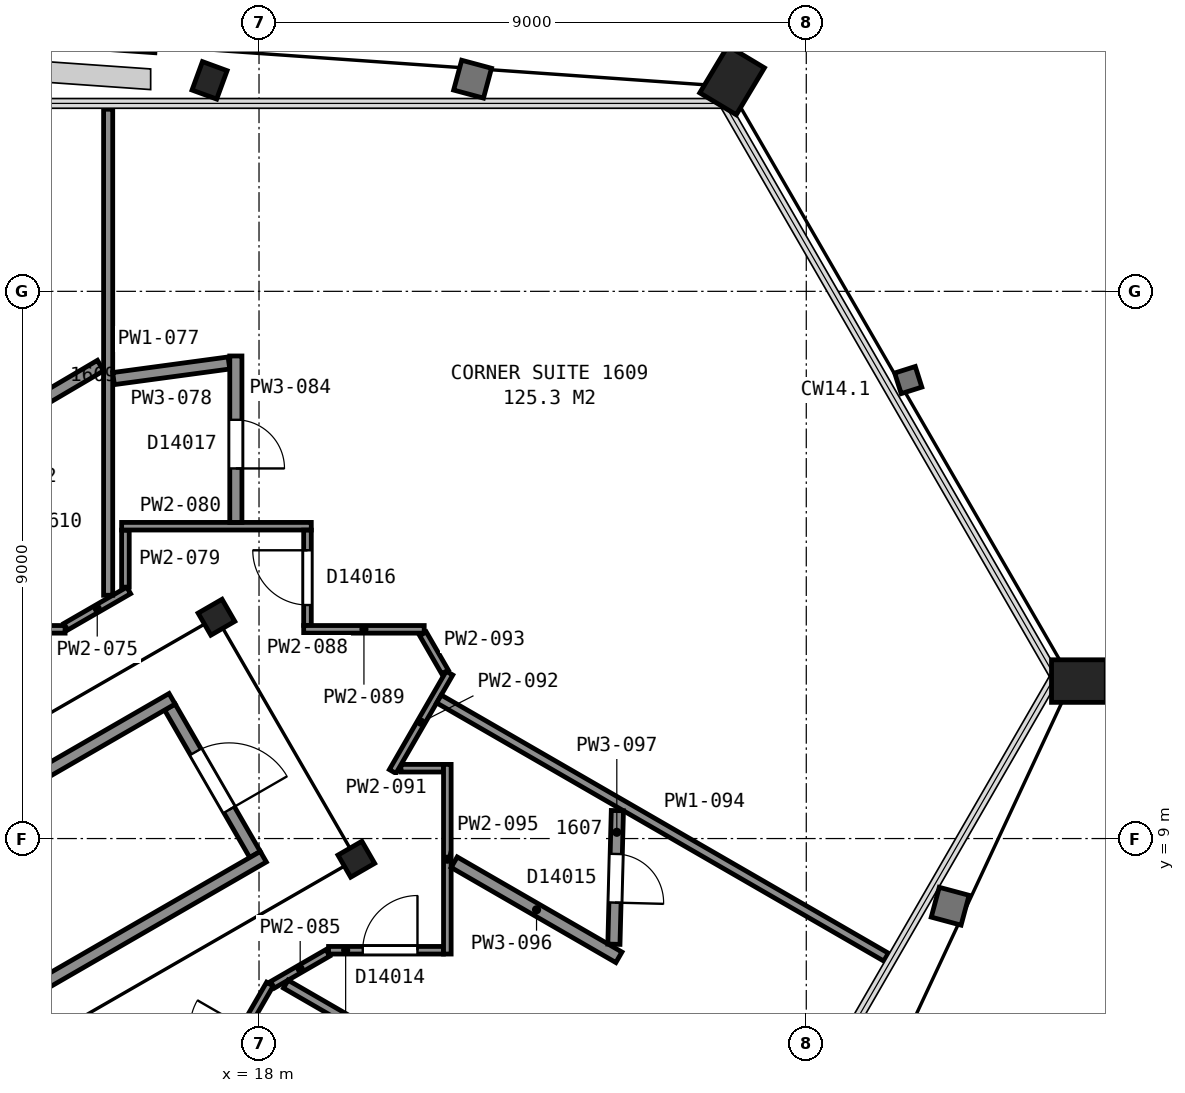
"""IFC4 building model, lengths in metres.
Left out: names, types, materials, properties, quantities, classifications, styles, units other than length and angle.
Written with IfcOpenShell. Run it as: python <this file> out.ifc"""

import sys

from ifc_helpers import new_model, si_unit, direction, frame, frame_2d, origin, origin_2d, place, context, subcontext, project, spatial, rectangle, hollow_rectangle, i_section, extrude, element, fill, save


model = new_model("IFC4")
c1 = context("Model", 3, precision=1e-05, world=origin(), true_north=direction((0.0, 1.0)))
c2 = subcontext(c1, "Body", "Model", "MODEL_VIEW")
j1 = project(units=[si_unit("LENGTHUNIT", "METRE"), si_unit("PLANEANGLEUNIT", "RADIAN")], contexts=[c1])
p1 = place(None, origin())
s1 = spatial("IfcSite", under=j1, at=p1, CompositionType="ELEMENT")
p2 = place(p1, origin())
s2 = spatial("IfcBuilding", under=s1, at=p2, CompositionType="ELEMENT")
p3 = place(p2, frame((0.0, 0.0, 72.8)))
s3 = spatial("IfcBuildingStorey", under=s2, at=p3, CompositionType="ELEMENT", Elevation=72.8)
p4 = place(p3, frame((25.722, 21.373, 0.04), z_axis=(0.049772291919, 0.082976830634, 0.995307773774), x_axis=(0.499550777014, -0.86500147592, 0.047132449981)))
e1 = element("IfcColumn", 1, at=p4, inside=s3, PredefinedType="COLUMN", context=c2, shape_type="SweptSolid", body=[
    extrude(hollow_rectangle(XDim=0.7, YDim=0.9, WallThickness=0.065, at=origin_2d()), origin(), (0.0, 0.0, 1.0), 3.537),
])
p5 = place(p3, frame((17.151, 21.372, 0.025), z_axis=(0.030414757347, 0.083024067354, 0.996083303131), x_axis=(0.999533369763, 0.000291044086, -0.030544361571)))
e2 = element("IfcColumn", 2, at=p5, inside=s3, PredefinedType="COLUMN", context=c2, shape_type="SweptSolid", body=[
    extrude(i_section(OverallWidth=0.432, OverallDepth=0.498, WebThickness=0.056, FlangeThickness=0.089, FilletRadius=0.015, at=origin_2d()), origin(), (0.0, 0.0, 1.0), 3.564),
])
p6 = place(p3, frame((31.374, 11.59, 0.04), z_axis=(0.094046562862, 0.0, 0.995567799808), x_axis=(0.499442771107, -0.865061250551, -0.047179987117)))
e3 = element("IfcColumn", 3, at=p6, inside=s3, PredefinedType="COLUMN", context=c2, shape_type="SweptSolid", body=[
    extrude(hollow_rectangle(XDim=0.7, YDim=0.9, WallThickness=0.065, at=origin_2d()), origin(), (0.0, 0.0, 1.0), 3.536),
])
for number, where, z_axis, x_axis in (
    (4, (19.6, 8.66, 0.0), (0.0, 0.0, 1.0), (0.5, -0.866, 0.0)),
    (5, (17.3, 12.64, 0.0), (0.0, 0.0, 1.0), (0.5, -0.866, 0.0)),
):
    element("IfcColumn", number, at=place(p3, frame(where, z_axis=z_axis, x_axis=x_axis)), inside=s3, PredefinedType="COLUMN", context=c2, shape_type="SweptSolid", body=[
        extrude(i_section(OverallWidth=0.419, OverallDepth=0.455, WebThickness=0.042, FlangeThickness=0.068, FilletRadius=0.015, at=origin_2d()), origin(), (0.0, 0.0, 1.0), 3.6),
    ])
p7 = place(p3, frame((17.934, 8.738, 0.0), z_axis=(0.0, 0.0, 1.0), x_axis=(-0.49998411664, 0.866034573852, 0.0)))
e6 = element("IfcWall", 6, at=p7, inside=s3, PredefinedType="PARTITIONING", context=c2, shape_type="SweptSolid", body=[
    extrude(rectangle(XDim=2.8, YDim=0.2, at=frame_2d((1.4, 0.0))), origin(), (0.0, 0.0, 1.0), 3.35),
])
p8 = place(p7, frame((0.85, 0.0, 0.0)))
e7 = element("IfcOpeningElement", 7, at=p8, cuts=e6, PredefinedType="OPENING", context=c2, shape_type="SweptSolid", body=[
    extrude(rectangle(XDim=1.1, YDim=2.1, at=frame_2d((0.55, 1.05))), frame((0.0, 0.11, 0.0), z_axis=(0.0, -1.0, 0.0), x_axis=(1.0, 0.0, 0.0)), (0.0, 0.0, 1.0), 0.22),
])
for number, where, z_axis, x_axis in (
    (8, (6.178, 5.299, 0.0), (0.0, 0.0, 1.0), (0.866, 0.5, 0.0)),
    (9, (7.678, 2.701, 0.0), (0.0, 0.0, 1.0), (0.866, 0.5, 0.0)),
):
    element("IfcWall", number, at=place(p3, frame(where, z_axis=z_axis, x_axis=x_axis)), inside=s3, PredefinedType="PARTITIONING", context=c2, shape_type="SweptSolid", body=[
        extrude(rectangle(XDim=12.0, YDim=0.2, at=frame_2d((6.0, 0.0))), origin(), (0.0, 0.0, 1.0), 3.35),
    ])
p9 = place(p3, frame((-14.811, 12.441, 0.0), z_axis=(0.0, 0.0, 1.0), x_axis=(1.0, 0.0, 0.0)))
e10 = element("IfcWall", 10, at=p9, inside=s3, PredefinedType="PARTITIONING", context=c2, shape_type="SweptSolid", body=[
    extrude(rectangle(XDim=29.621, YDim=0.125, at=frame_2d((14.811, 0.0))), origin(), (0.0, 0.0, 1.0), 2.613),
])
p10 = place(p9, frame((25.326, 0.0, 0.0)))
e11 = element("IfcOpeningElement", 11, at=p10, cuts=e10, PredefinedType="OPENING", context=c2, shape_type="SweptSolid", body=[
    extrude(rectangle(XDim=0.9, YDim=2.1, at=frame_2d((0.45, 1.05))), frame((0.0, 0.073, 0.0), z_axis=(0.0, -1.0, 0.0), x_axis=(1.0, 0.0, 0.0)), (0.0, 0.0, 1.0), 0.145),
])
p11 = place(p9, frame((21.833, 0.0, 0.0)))
e12 = element("IfcOpeningElement", 12, at=p11, cuts=e10, PredefinedType="OPENING", context=c2, shape_type="SweptSolid", body=[
    extrude(rectangle(XDim=0.9, YDim=2.1, at=frame_2d((0.45, 1.05))), frame((0.0, 0.073, 0.0), z_axis=(0.0, -1.0, 0.0), x_axis=(1.0, 0.0, 0.0)), (0.0, 0.0, 1.0), 0.145),
])
p12 = place(p9, frame((14.99, 0.0, 0.0)))
e13 = element("IfcOpeningElement", 13, at=p12, cuts=e10, PredefinedType="OPENING", context=c2, shape_type="SweptSolid", body=[
    extrude(rectangle(XDim=0.9, YDim=2.1, at=frame_2d((0.45, 1.05))), frame((0.0, 0.073, 0.0), z_axis=(0.0, -1.0, 0.0), x_axis=(1.0, 0.0, 0.0)), (0.0, 0.0, 1.0), 0.145),
])
p13 = place(p9, frame((12.128, 0.0, 0.0)))
e14 = element("IfcOpeningElement", 14, at=p13, cuts=e10, PredefinedType="OPENING", context=c2, shape_type="SweptSolid", body=[
    extrude(rectangle(XDim=0.9, YDim=2.1, at=frame_2d((0.45, 1.05))), frame((0.0, 0.073, 0.0), z_axis=(0.0, -1.0, 0.0), x_axis=(1.0, 0.0, 0.0)), (0.0, 0.0, 1.0), 0.145),
])
p14 = place(p9, frame((4.885, 0.0, 0.0)))
e15 = element("IfcOpeningElement", 15, at=p14, cuts=e10, PredefinedType="OPENING", context=c2, shape_type="SweptSolid", body=[
    extrude(rectangle(XDim=0.9, YDim=2.1, at=frame_2d((0.45, 1.05))), frame((0.0, 0.073, 0.0), z_axis=(0.0, -1.0, 0.0), x_axis=(1.0, 0.0, 0.0)), (0.0, 0.0, 1.0), 0.145),
])
p15 = place(p9, frame((2.241, 0.0, 0.0)))
e16 = element("IfcOpeningElement", 16, at=p15, cuts=e10, PredefinedType="OPENING", context=c2, shape_type="SweptSolid", body=[
    extrude(rectangle(XDim=0.9, YDim=2.1, at=frame_2d((0.45, 1.05))), frame((0.0, 0.073, 0.0), z_axis=(0.0, -1.0, 0.0), x_axis=(1.0, 0.0, 0.0)), (0.0, 0.0, 1.0), 0.145),
])
p16 = place(p3, frame((18.179, 6.606, 0.0), z_axis=(0.0, 0.0, 1.0), x_axis=(-0.500003973642, -0.866023109589, 0.0)))
e17 = element("IfcWall", 17, at=p16, inside=s3, PredefinedType="PARTITIONING", context=c2, shape_type="SweptSolid", body=[
    extrude(rectangle(XDim=28.826, YDim=0.125, at=frame_2d((14.413, 0.0))), origin(), (0.0, 0.0, 1.0), 2.613),
])
p17 = place(p16, frame((21.501, 0.0, 0.0)))
e18 = element("IfcOpeningElement", 18, at=p17, cuts=e17, PredefinedType="OPENING", context=c2, shape_type="SweptSolid", body=[
    extrude(rectangle(XDim=0.9, YDim=2.1, at=frame_2d((0.45, 1.05))), frame((0.0, 0.073, 0.0), z_axis=(0.0, -1.0, 0.0), x_axis=(1.0, 0.0, 0.0)), (0.0, 0.0, 1.0), 0.145),
])
p18 = place(p16, frame((18.894, 0.0, 0.0)))
e19 = element("IfcOpeningElement", 19, at=p18, cuts=e17, PredefinedType="OPENING", context=c2, shape_type="SweptSolid", body=[
    extrude(rectangle(XDim=0.9, YDim=2.1, at=frame_2d((0.45, 1.05))), frame((0.0, 0.073, 0.0), z_axis=(0.0, -1.0, 0.0), x_axis=(1.0, 0.0, 0.0)), (0.0, 0.0, 1.0), 0.145),
])
p19 = place(p16, frame((10.937, 0.0, 0.0)))
e20 = element("IfcOpeningElement", 20, at=p19, cuts=e17, PredefinedType="OPENING", context=c2, shape_type="SweptSolid", body=[
    extrude(rectangle(XDim=0.9, YDim=2.1, at=frame_2d((0.45, 1.05))), frame((0.0, 0.073, 0.0), z_axis=(0.0, -1.0, 0.0), x_axis=(1.0, 0.0, 0.0)), (0.0, 0.0, 1.0), 0.145),
])
p20 = place(p16, frame((7.535, 0.0, 0.0)))
e21 = element("IfcOpeningElement", 21, at=p20, cuts=e17, PredefinedType="OPENING", context=c2, shape_type="SweptSolid", body=[
    extrude(rectangle(XDim=0.9, YDim=2.1, at=frame_2d((0.45, 1.05))), frame((0.0, 0.073, 0.0), z_axis=(0.0, -1.0, 0.0), x_axis=(1.0, 0.0, 0.0)), (0.0, 0.0, 1.0), 0.145),
])
p21 = place(p16, frame((0.827, 0.0, 0.0)))
e22 = element("IfcOpeningElement", 22, at=p21, cuts=e17, PredefinedType="OPENING", context=c2, shape_type="SweptSolid", body=[
    extrude(rectangle(XDim=0.9, YDim=2.1, at=frame_2d((0.45, 1.05))), frame((0.0, 0.073, 0.0), z_axis=(0.0, -1.0, 0.0), x_axis=(1.0, 0.0, 0.0)), (0.0, 0.0, 1.0), 0.145),
])
p22 = place(p3, frame((13.235, 15.51, 0.0), z_axis=(0.0, 0.0, 1.0), x_axis=(0.861909146735, 0.507062740471, 0.0)))
e23 = element("IfcWall", 23, at=p22, inside=s3, PredefinedType="PARTITIONING", context=c2, shape_type="SweptSolid", body=[
    extrude(rectangle(XDim=2.504, YDim=0.2, at=frame_2d((1.252, 0.0))), origin(), (0.0, 0.0, 1.0), 2.613),
])
p23 = place(p3, frame((14.822, 12.483, 0.0), z_axis=(0.0, 0.0, 1.0), x_axis=(0.866035997947, 0.499981649923, 0.0)))
e24 = element("IfcWall", 24, at=p23, inside=s3, PredefinedType="PARTITIONING", context=c2, shape_type="SweptSolid", body=[
    extrude(rectangle(XDim=1.196, YDim=0.125, at=frame_2d((0.598, 0.0))), origin(), (0.0, 0.0, 1.0), 2.613),
])
p24 = place(p3, frame((15.519, 13.001, 0.0), z_axis=(0.0, 0.0, 1.0), x_axis=(0.0, 1.0, 0.0)))
e25 = element("IfcWall", 25, at=p24, inside=s3, PredefinedType="PARTITIONING", context=c2, shape_type="SweptSolid", body=[
    extrude(rectangle(XDim=7.994, YDim=0.15, at=frame_2d((3.997, 0.0))), origin(), (0.0, 0.0, 1.0), 2.613),
])
p25 = place(p3, frame((15.607, 16.565, 0.0), z_axis=(0.0, 0.0, 1.0), x_axis=(0.990982367401, 0.133992341199, 0.0)))
e26 = element("IfcWall", 26, at=p25, inside=s3, PredefinedType="PARTITIONING", context=c2, shape_type="SweptSolid", body=[
    extrude(rectangle(XDim=1.915, YDim=0.2, at=frame_2d((0.958, 0.0))), origin(), (0.0, 0.0, 1.0), 2.613),
])
p26 = place(p3, frame((15.803, 13.135, 0.0), z_axis=(0.0, 0.0, 1.0), x_axis=(0.0, 1.0, 0.0)))
e27 = element("IfcWall", 27, at=p26, inside=s3, PredefinedType="PARTITIONING", context=c2, shape_type="SweptSolid", body=[
    extrude(rectangle(XDim=0.937, YDim=0.125, at=frame_2d((0.469, 0.0))), origin(), (0.0, 0.0, 1.0), 2.613),
])
p27 = place(p3, frame((15.74, 14.137, 0.0), z_axis=(0.0, 0.0, 1.0), x_axis=(1.0, 0.0, 0.0)))
e28 = element("IfcWall", 28, at=p27, inside=s3, PredefinedType="PARTITIONING", context=c2, shape_type="SweptSolid", body=[
    extrude(rectangle(XDim=3.119, YDim=0.125, at=frame_2d((1.56, 0.0))), origin(), (0.0, 0.0, 1.0), 2.613),
])
p28 = place(p3, frame((17.619, 14.199, 0.0), z_axis=(0.0, 0.0, 1.0), x_axis=(0.0, 1.0, 0.0)))
e29 = element("IfcWall", 29, at=p28, inside=s3, PredefinedType="PARTITIONING", context=c2, shape_type="SweptSolid", body=[
    extrude(rectangle(XDim=2.738, YDim=0.2, at=frame_2d((1.369, 0.0))), origin(), (0.0, 0.0, 1.0), 2.613),
])
p29 = place(p28, frame((0.887, 0.0, 0.0)))
e30 = element("IfcOpeningElement", 30, at=p29, cuts=e29, PredefinedType="OPENING", context=c2, shape_type="SweptSolid", body=[
    extrude(rectangle(XDim=0.8, YDim=2.1, at=frame_2d((0.4, 1.05))), frame((0.0, 0.11, 0.0), z_axis=(0.0, -1.0, 0.0), x_axis=(1.0, 0.0, 0.0)), (0.0, 0.0, 1.0), 0.22),
])
p30 = place(p3, frame((18.222, 6.594, 0.0), z_axis=(0.0, 0.0, 1.0), x_axis=(0.865876245925, 0.500258260045, 0.0)))
e31 = element("IfcWall", 31, at=p30, inside=s3, PredefinedType="PARTITIONING", context=c2, shape_type="SweptSolid", body=[
    extrude(rectangle(XDim=1.052, YDim=0.125, at=frame_2d((0.526, 0.0))), origin(), (0.0, 0.0, 1.0), 2.613),
])
p31 = place(p3, frame((18.44, 6.605, 0.0), z_axis=(0.0, 0.0, 1.0), x_axis=(0.866044499518, -0.49996692376, 0.0)))
e32 = element("IfcWall", 32, at=p31, inside=s3, PredefinedType="PARTITIONING", context=c2, shape_type="SweptSolid", body=[
    extrude(rectangle(XDim=8.328, YDim=0.15, at=frame_2d((4.164, 0.0))), origin(), (0.0, 0.0, 1.0), 2.613),
])
p32 = place(p3, frame((18.797, 14.072, 0.0), z_axis=(0.0, 0.0, 1.0), x_axis=(0.0, -1.0, 0.0)))
e33 = element("IfcWall", 33, at=p32, inside=s3, PredefinedType="PARTITIONING", context=c2, shape_type="SweptSolid", body=[
    extrude(rectangle(XDim=1.566, YDim=0.125, at=frame_2d((0.783, 0.0))), origin(), (0.0, 0.0, 1.0), 2.613),
])
p33 = place(p32, frame((0.331, 0.0, 0.0)))
e34 = element("IfcOpeningElement", 34, at=p33, cuts=e33, PredefinedType="OPENING", context=c2, shape_type="SweptSolid", body=[
    extrude(rectangle(XDim=0.9, YDim=2.1, at=frame_2d((0.45, 1.05))), frame((0.0, 0.073, 0.0), z_axis=(0.0, -1.0, 0.0), x_axis=(1.0, 0.0, 0.0)), (0.0, 0.0, 1.0), 0.145),
])
p34 = place(p3, frame((18.735, 12.441, 0.0), z_axis=(0.0, 0.0, 1.0), x_axis=(1.0, 0.0, 0.0)))
e35 = element("IfcWall", 35, at=p34, inside=s3, PredefinedType="PARTITIONING", context=c2, shape_type="SweptSolid", body=[
    extrude(rectangle(XDim=1.982, YDim=0.125, at=frame_2d((0.991, 0.0))), origin(), (0.0, 0.0, 1.0), 2.613),
])
p35 = place(p3, frame((21.032, 7.163, 0.0), z_axis=(0.0, 0.0, 1.0), x_axis=(-1.0, 0.0, 0.0)))
e36 = element("IfcWall", 36, at=p35, inside=s3, PredefinedType="PARTITIONING", context=c2, shape_type="SweptSolid", body=[
    extrude(rectangle(XDim=1.888, YDim=0.125, at=frame_2d((0.944, 0.0))), origin(), (0.0, 0.0, 1.0), 2.613),
])
p36 = place(p35, frame((0.426, 0.0, 0.0)))
e37 = element("IfcOpeningElement", 37, at=p36, cuts=e36, PredefinedType="OPENING", context=c2, shape_type="SweptSolid", body=[
    extrude(rectangle(XDim=0.9, YDim=2.1, at=frame_2d((0.45, 1.05))), frame((0.0, 0.073, 0.0), z_axis=(0.0, -1.0, 0.0), x_axis=(1.0, 0.0, 0.0)), (0.0, 0.0, 1.0), 0.145),
])
p37 = place(p3, frame((20.334, 10.157, 0.0), z_axis=(0.0, 0.0, 1.0), x_axis=(1.0, 0.0, 0.0)))
e38 = element("IfcWall", 38, at=p37, inside=s3, PredefinedType="PARTITIONING", context=c2, shape_type="SweptSolid", body=[
    extrude(rectangle(XDim=0.698, YDim=0.125, at=frame_2d((0.349, 0.0))), origin(), (0.0, 0.0, 1.0), 2.613),
])
p38 = place(p3, frame((20.198, 10.103, 0.0), z_axis=(0.0, 0.0, 1.0), x_axis=(0.500072997275, 0.865983254686, 0.0)))
e39 = element("IfcWall", 39, at=p38, inside=s3, PredefinedType="PARTITIONING", context=c2, shape_type="SweptSolid", body=[
    extrude(rectangle(XDim=1.869, YDim=0.125, at=frame_2d((0.935, 0.0))), origin(), (0.0, 0.0, 1.0), 2.613),
])
p39 = place(p3, frame((20.697, 12.367, 0.0), z_axis=(0.0, 0.0, 1.0), x_axis=(0.500238258503, -0.865887801468, 0.0)))
e40 = element("IfcWall", 40, at=p39, inside=s3, PredefinedType="PARTITIONING", context=c2, shape_type="SweptSolid", body=[
    extrude(rectangle(XDim=0.724, YDim=0.125, at=frame_2d((0.362, 0.0))), origin(), (0.0, 0.0, 1.0), 2.613),
])
p40 = place(p3, frame((20.959, 11.296, 0.0), z_axis=(0.0, 0.0, 1.0), x_axis=(0.866022790583, -0.50000452617, 0.0)))
e41 = element("IfcWall", 41, at=p40, inside=s3, PredefinedType="PARTITIONING", context=c2, shape_type="SweptSolid", body=[
    extrude(rectangle(XDim=8.491, YDim=0.15, at=frame_2d((4.246, 0.0))), origin(), (0.0, 0.0, 1.0), 2.613),
])
p41 = place(p3, frame((21.097, 7.101, 0.0), z_axis=(0.0, 0.0, 1.0), x_axis=(0.0, 1.0, 0.0)))
e42 = element("IfcWall", 42, at=p41, inside=s3, PredefinedType="PARTITIONING", context=c2, shape_type="SweptSolid", body=[
    extrude(rectangle(XDim=3.119, YDim=0.125, at=frame_2d((1.56, 0.0))), origin(), (0.0, 0.0, 1.0), 2.613),
])
p42 = place(p3, frame((21.209, 8.611, 0.0), z_axis=(0.0, 0.0, 1.0), x_axis=(0.866054327916, -0.499949898588, 0.0)))
e43 = element("IfcWall", 43, at=p42, inside=s3, PredefinedType="PARTITIONING", context=c2, shape_type="SweptSolid", body=[
    extrude(rectangle(XDim=3.128, YDim=0.2, at=frame_2d((1.564, 0.0))), origin(), (0.0, 0.0, 1.0), 2.613),
])
p43 = place(p3, frame((23.836, 7.262, 0.0), z_axis=(0.0, 0.0, 1.0), x_axis=(0.025988330811, 0.999662246292, 0.0)))
e44 = element("IfcWall", 44, at=p43, inside=s3, PredefinedType="PARTITIONING", context=c2, shape_type="SweptSolid", body=[
    extrude(rectangle(XDim=2.198, YDim=0.2, at=frame_2d((1.099, 0.0))), origin(), (0.0, 0.0, 1.0), 2.613),
])
p44 = place(p43, frame((0.685, 0.0, 0.0)))
e45 = element("IfcOpeningElement", 45, at=p44, cuts=e44, PredefinedType="OPENING", context=c2, shape_type="SweptSolid", body=[
    extrude(rectangle(XDim=0.8, YDim=2.1, at=frame_2d((0.4, 1.05))), frame((0.0, 0.11, 0.0), z_axis=(0.0, -1.0, 0.0), x_axis=(1.0, 0.0, 0.0)), (0.0, 0.0, 1.0), 0.22),
])
p45 = place(p8, origin())
e46 = element("IfcDoor", 46, at=p45, inside=s3, OperationType="SINGLE_SWING_LEFT", PredefinedType="DOOR", context=c2, shape_type="SweptSolid", body=[
    extrude(rectangle(XDim=1.1, YDim=2.1, at=frame_2d((0.55, 1.05))), frame((0.0, 0.025, 0.0), z_axis=(0.0, -1.0, 0.0), x_axis=(1.0, 0.0, 0.0)), (0.0, 0.0, 1.0), 0.05),
])
fill(e7, e46)
p46 = place(p29, origin())
e47 = element("IfcDoor", 47, at=p46, inside=s3, OperationType="SINGLE_SWING_LEFT", PredefinedType="DOOR", context=c2, shape_type="SweptSolid", body=[
    extrude(rectangle(XDim=0.8, YDim=2.1, at=frame_2d((0.4, 1.05))), frame((0.0, 0.025, 0.0), z_axis=(0.0, -1.0, 0.0), x_axis=(1.0, 0.0, 0.0)), (0.0, 0.0, 1.0), 0.05),
])
fill(e30, e47)
p47 = place(p33, origin())
e48 = element("IfcDoor", 48, at=p47, inside=s3, OperationType="SINGLE_SWING_LEFT", PredefinedType="DOOR", context=c2, shape_type="SweptSolid", body=[
    extrude(rectangle(XDim=0.9, YDim=2.1, at=frame_2d((0.45, 1.05))), frame((0.0, 0.025, 0.0), z_axis=(0.0, -1.0, 0.0), x_axis=(1.0, 0.0, 0.0)), (0.0, 0.0, 1.0), 0.05),
])
fill(e34, e48)
p48 = place(p36, origin())
e49 = element("IfcDoor", 49, at=p48, inside=s3, OperationType="SINGLE_SWING_LEFT", PredefinedType="DOOR", context=c2, shape_type="SweptSolid", body=[
    extrude(rectangle(XDim=0.9, YDim=2.1, at=frame_2d((0.45, 1.05))), frame((0.0, 0.025, 0.0), z_axis=(0.0, -1.0, 0.0), x_axis=(1.0, 0.0, 0.0)), (0.0, 0.0, 1.0), 0.05),
])
fill(e37, e49)
p49 = place(p44, origin())
e50 = element("IfcDoor", 50, at=p49, inside=s3, OperationType="SINGLE_SWING_LEFT", PredefinedType="DOOR", context=c2, shape_type="SweptSolid", body=[
    extrude(rectangle(XDim=0.8, YDim=2.1, at=frame_2d((0.4, 1.05))), frame((0.0, 0.025, 0.0), z_axis=(0.0, -1.0, 0.0), x_axis=(1.0, 0.0, 0.0)), (0.0, 0.0, 1.0), 0.05),
])
fill(e45, e50)
save(model, sys.argv[1])
